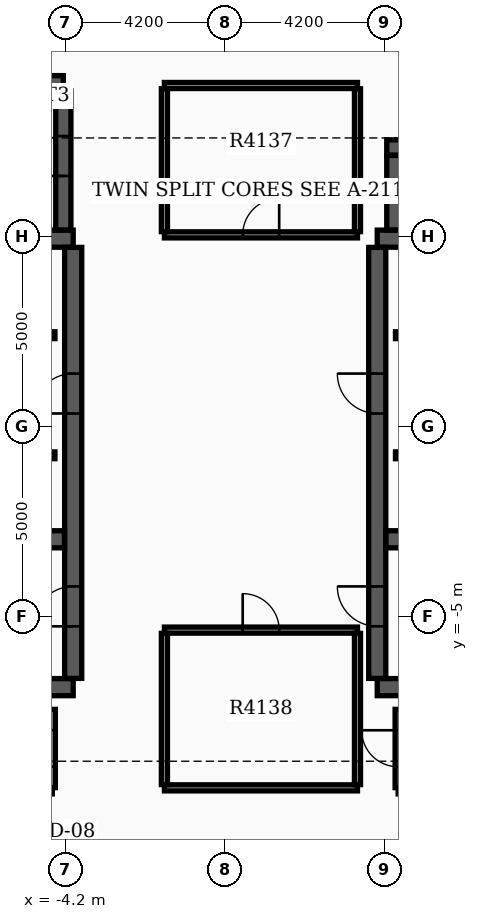
"""IFC4 building model, lengths in metres.
Left out: names, types, materials, properties, quantities, classifications, styles, units other than length and angle.
Written with IfcOpenShell. Run it as: python <this file> out.ifc"""

import sys

from ifc_helpers import new_model, si_unit, direction, frame, frame_2d, origin, place, context, subcontext, project, spatial, rectangle, extrude, element, fill, save


model = new_model("IFC4")
c1 = context("Model", 3, precision=1e-05, world=origin(), true_north=direction((0.0, 1.0)))
c2 = subcontext(c1, "Body", "Model", "MODEL_VIEW")
j1 = project(units=[si_unit("LENGTHUNIT", "METRE"), si_unit("PLANEANGLEUNIT", "RADIAN")], contexts=[c1])
p1 = place(None, origin())
s1 = spatial("IfcSite", under=j1, at=p1, CompositionType="ELEMENT")
p2 = place(p1, origin())
s2 = spatial("IfcBuilding", under=s1, at=p2, CompositionType="ELEMENT")
p3 = place(p2, frame((0.0, 0.0, 261.6)))
s3 = spatial("IfcBuildingStorey", under=s2, at=p3, CompositionType="ELEMENT", Elevation=261.6)
for number, where, z_axis, x_axis in (
    (1, (-12.4, -6.85, 0.0), (0.0, 0.0, 1.0), (1.0, 0.0, 0.0)),
    (2, (-12.4, 4.95, 0.0), (0.0, 0.0, 1.0), (1.0, 0.0, 0.0)),
):
    element("IfcWall", number, at=place(p3, frame(where, z_axis=z_axis, x_axis=x_axis)), inside=s3, PredefinedType="SHEAR", context=c2, shape_type="SweptSolid", body=[
        extrude(rectangle(XDim=8.4, YDim=0.45, at=frame_2d((4.2, 0.0))), origin(), (0.0, 0.0, 1.0), 3.7),
    ])
p4 = place(p3, frame((-4.0, -6.62, 0.0), z_axis=(0.0, 0.0, 1.0), x_axis=(0.0, 1.0, 0.0)))
e3 = element("IfcWall", 3, at=p4, inside=s3, PredefinedType="SHEAR", context=c2, shape_type="SweptSolid", body=[
    extrude(rectangle(XDim=11.34, YDim=0.45, at=frame_2d((5.67, 0.0))), origin(), (0.0, 0.0, 1.0), 3.7),
])
p5 = place(p4, frame((1.37, 0.0, 0.0)))
e4 = element("IfcOpeningElement", 4, at=p5, cuts=e3, PredefinedType="OPENING", context=c2, shape_type="SweptSolid", body=[
    extrude(rectangle(XDim=1.05, YDim=2.15, at=frame_2d((0.525, 1.075))), frame((0.0, 0.235, 0.0), z_axis=(0.0, -1.0, 0.0), x_axis=(1.0, 0.0, 0.0)), (0.0, 0.0, 1.0), 0.47),
])
p6 = place(p4, frame((6.97, 0.0, 0.0)))
e5 = element("IfcOpeningElement", 5, at=p6, cuts=e3, PredefinedType="OPENING", context=c2, shape_type="SweptSolid", body=[
    extrude(rectangle(XDim=1.05, YDim=2.15, at=frame_2d((0.525, 1.075))), frame((0.0, 0.235, 0.0), z_axis=(0.0, -1.0, 0.0), x_axis=(1.0, 0.0, 0.0)), (0.0, 0.0, 1.0), 0.47),
])
p7 = place(p3, frame((-12.17, -2.96, 0.0), z_axis=(0.0, 0.0, 1.0), x_axis=(1.0, 0.0, 0.0)))
e6 = element("IfcWall", 6, at=p7, inside=s3, PredefinedType="SHEAR", context=c2, shape_type="SweptSolid", body=[
    extrude(rectangle(XDim=7.94, YDim=0.45, at=frame_2d((3.97, 0.0))), origin(), (0.0, 0.0, 1.0), 3.7),
])
for number, where, z_axis, x_axis in (
    (7, (4.0, -6.85, 0.0), (0.0, 0.0, 1.0), (1.0, 0.0, 0.0)),
    (8, (4.0, 4.95, 0.0), (0.0, 0.0, 1.0), (1.0, 0.0, 0.0)),
):
    element("IfcWall", number, at=place(p3, frame(where, z_axis=z_axis, x_axis=x_axis)), inside=s3, PredefinedType="SHEAR", context=c2, shape_type="SweptSolid", body=[
        extrude(rectangle(XDim=8.4, YDim=0.45, at=frame_2d((4.2, 0.0))), origin(), (0.0, 0.0, 1.0), 3.7),
    ])
p8 = place(p3, frame((4.0, -6.62, 0.0), z_axis=(0.0, 0.0, 1.0), x_axis=(0.0, 1.0, 0.0)))
e9 = element("IfcWall", 9, at=p8, inside=s3, PredefinedType="SHEAR", context=c2, shape_type="SweptSolid", body=[
    extrude(rectangle(XDim=11.34, YDim=0.45, at=frame_2d((5.67, 0.0))), origin(), (0.0, 0.0, 1.0), 3.7),
])
p9 = place(p8, frame((1.37, 0.0, 0.0)))
e10 = element("IfcOpeningElement", 10, at=p9, cuts=e9, PredefinedType="OPENING", context=c2, shape_type="SweptSolid", body=[
    extrude(rectangle(XDim=1.05, YDim=2.15, at=frame_2d((0.525, 1.075))), frame((0.0, 0.235, 0.0), z_axis=(0.0, -1.0, 0.0), x_axis=(1.0, 0.0, 0.0)), (0.0, 0.0, 1.0), 0.47),
])
p10 = place(p8, frame((6.97, 0.0, 0.0)))
e11 = element("IfcOpeningElement", 11, at=p10, cuts=e9, PredefinedType="OPENING", context=c2, shape_type="SweptSolid", body=[
    extrude(rectangle(XDim=1.05, YDim=2.15, at=frame_2d((0.525, 1.075))), frame((0.0, 0.235, 0.0), z_axis=(0.0, -1.0, 0.0), x_axis=(1.0, 0.0, 0.0)), (0.0, 0.0, 1.0), 0.47),
])
p11 = place(p3, frame((4.23, -2.96, 0.0), z_axis=(0.0, 0.0, 1.0), x_axis=(1.0, 0.0, 0.0)))
e12 = element("IfcWall", 12, at=p11, inside=s3, PredefinedType="SHEAR", context=c2, shape_type="SweptSolid", body=[
    extrude(rectangle(XDim=7.94, YDim=0.45, at=frame_2d((3.97, 0.0))), origin(), (0.0, 0.0, 1.0), 3.7),
])
p12 = place(p3, frame((-12.22, 9.04, 0.0), z_axis=(0.0, 0.0, 1.0), x_axis=(1.0, 0.0, 0.0)))
e13 = element("IfcWall", 13, at=p12, inside=s3, PredefinedType="SHEAR", context=c2, shape_type="SweptSolid", body=[
    extrude(rectangle(XDim=7.96, YDim=0.4, at=frame_2d((3.98, 0.0))), origin(), (0.0, 0.0, 1.0), 3.7),
])
p13 = place(p3, frame((-4.26, 5.18, 0.0), z_axis=(0.0, 0.0, 1.0), x_axis=(0.0, 1.0, 0.0)))
e14 = element("IfcWall", 14, at=p13, inside=s3, PredefinedType="SHEAR", context=c2, shape_type="SweptSolid", body=[
    extrude(rectangle(XDim=3.655, YDim=0.4, at=frame_2d((1.828, 0.0))), origin(), (0.0, 0.0, 1.0), 3.7),
])
p14 = place(p13, frame((1.42, 0.0, 0.0)))
e15 = element("IfcOpeningElement", 15, at=p14, cuts=e14, PredefinedType="OPENING", context=c2, shape_type="SweptSolid", body=[
    extrude(rectangle(XDim=1.05, YDim=2.15, at=frame_2d((0.525, 1.075))), frame((0.0, 0.21, 0.0), z_axis=(0.0, -1.0, 0.0), x_axis=(1.0, 0.0, 0.0)), (0.0, 0.0, 1.0), 0.42),
])
p15 = place(p3, frame((4.45, 5.18, 0.0), z_axis=(0.0, 0.0, 1.0), x_axis=(0.0, 1.0, 0.0)))
e16 = element("IfcWall", 16, at=p15, inside=s3, PredefinedType="SHEAR", context=c2, shape_type="SweptSolid", body=[
    extrude(rectangle(XDim=1.96, YDim=0.4, at=frame_2d((0.98, 0.0))), origin(), (0.0, 0.0, 1.0), 3.7),
])
p16 = place(p3, frame((4.25, 7.35, 0.0), z_axis=(0.0, 0.0, 1.0), x_axis=(1.0, 0.0, 0.0)))
e17 = element("IfcWall", 17, at=p16, inside=s3, PredefinedType="SHEAR", context=c2, shape_type="SweptSolid", body=[
    extrude(rectangle(XDim=5.4, YDim=0.4, at=frame_2d((2.7, 0.0))), origin(), (0.0, 0.0, 1.0), 3.7),
])
p17 = place(p3, frame((-11.9, 2.41, 0.0), z_axis=(0.0, 0.0, 1.0), x_axis=(1.0, 0.0, 0.0)))
e18 = element("IfcWall", 18, at=p17, inside=s3, PredefinedType="SOLIDWALL", context=c2, shape_type="SweptSolid", body=[
    extrude(rectangle(XDim=7.42, YDim=0.18, at=frame_2d((3.71, 0.0))), origin(), (0.0, 0.0, 1.0), 3.17),
])
p18 = place(p17, frame((0.55, 0.0, 0.0)))
e19 = element("IfcOpeningElement", 19, at=p18, cuts=e18, PredefinedType="OPENING", context=c2, shape_type="SweptSolid", body=[
    extrude(rectangle(XDim=1.1, YDim=2.15, at=frame_2d((0.55, 1.075))), frame((0.0, 0.1, 0.0), z_axis=(0.0, -1.0, 0.0), x_axis=(1.0, 0.0, 0.0)), (0.0, 0.0, 1.0), 0.2),
])
p19 = place(p17, frame((4.9, 0.0, 0.0)))
e20 = element("IfcOpeningElement", 20, at=p19, cuts=e18, PredefinedType="OPENING", context=c2, shape_type="SweptSolid", body=[
    extrude(rectangle(XDim=0.88, YDim=2.1, at=frame_2d((0.44, 1.05))), frame((0.0, 0.1, 0.0), z_axis=(0.0, -1.0, 0.0), x_axis=(1.0, 0.0, 0.0)), (0.0, 0.0, 1.0), 0.2),
])
p20 = place(p3, frame((4.48, 2.41, 0.0), z_axis=(0.0, 0.0, 1.0), x_axis=(1.0, 0.0, 0.0)))
e21 = element("IfcWall", 21, at=p20, inside=s3, PredefinedType="SOLIDWALL", context=c2, shape_type="SweptSolid", body=[
    extrude(rectangle(XDim=7.42, YDim=0.18, at=frame_2d((3.71, 0.0))), origin(), (0.0, 0.0, 1.0), 3.17),
])
p21 = place(p20, frame((5.67, 0.0, 0.0)))
e22 = element("IfcOpeningElement", 22, at=p21, cuts=e21, PredefinedType="OPENING", context=c2, shape_type="SweptSolid", body=[
    extrude(rectangle(XDim=1.1, YDim=2.15, at=frame_2d((0.55, 1.075))), frame((0.0, 0.1, 0.0), z_axis=(0.0, -1.0, 0.0), x_axis=(1.0, 0.0, 0.0)), (0.0, 0.0, 1.0), 0.2),
])
p22 = place(p20, frame((1.6, 0.0, 0.0)))
e23 = element("IfcOpeningElement", 23, at=p22, cuts=e21, PredefinedType="OPENING", context=c2, shape_type="SweptSolid", body=[
    extrude(rectangle(XDim=0.88, YDim=2.1, at=frame_2d((0.44, 1.05))), frame((0.0, 0.1, 0.0), z_axis=(0.0, -1.0, 0.0), x_axis=(1.0, 0.0, 0.0)), (0.0, 0.0, 1.0), 0.2),
])
p23 = place(p3, frame((-11.9, -0.75, 0.0), z_axis=(0.0, 0.0, 1.0), x_axis=(1.0, 0.0, 0.0)))
e24 = element("IfcWall", 24, at=p23, inside=s3, PredefinedType="SOLIDWALL", context=c2, shape_type="SweptSolid", body=[
    extrude(rectangle(XDim=7.42, YDim=0.18, at=frame_2d((3.71, 0.0))), origin(), (0.0, 0.0, 1.0), 3.17),
])
p24 = place(p23, frame((5.75, 0.0, 0.0)))
e25 = element("IfcOpeningElement", 25, at=p24, cuts=e24, PredefinedType="OPENING", context=c2, shape_type="SweptSolid", body=[
    extrude(rectangle(XDim=1.1, YDim=2.15, at=frame_2d((0.55, 1.075))), frame((0.0, 0.1, 0.0), z_axis=(0.0, -1.0, 0.0), x_axis=(1.0, 0.0, 0.0)), (0.0, 0.0, 1.0), 0.2),
])
p25 = place(p23, frame((1.6, 0.0, 0.0)))
e26 = element("IfcOpeningElement", 26, at=p25, cuts=e24, PredefinedType="OPENING", context=c2, shape_type="SweptSolid", body=[
    extrude(rectangle(XDim=0.88, YDim=2.1, at=frame_2d((0.44, 1.05))), frame((0.0, 0.1, 0.0), z_axis=(0.0, -1.0, 0.0), x_axis=(1.0, 0.0, 0.0)), (0.0, 0.0, 1.0), 0.2),
])
p26 = place(p3, frame((4.48, -0.75, 0.0), z_axis=(0.0, 0.0, 1.0), x_axis=(1.0, 0.0, 0.0)))
e27 = element("IfcWall", 27, at=p26, inside=s3, PredefinedType="SOLIDWALL", context=c2, shape_type="SweptSolid", body=[
    extrude(rectangle(XDim=7.42, YDim=0.18, at=frame_2d((3.71, 0.0))), origin(), (0.0, 0.0, 1.0), 3.17),
])
p27 = place(p26, frame((3.92, 0.0, 0.0)))
e28 = element("IfcOpeningElement", 28, at=p27, cuts=e27, PredefinedType="OPENING", context=c2, shape_type="SweptSolid", body=[
    extrude(rectangle(XDim=1.1, YDim=2.15, at=frame_2d((0.55, 1.075))), frame((0.0, 0.1, 0.0), z_axis=(0.0, -1.0, 0.0), x_axis=(1.0, 0.0, 0.0)), (0.0, 0.0, 1.0), 0.2),
])
p28 = place(p26, frame((5.82, 0.0, 0.0)))
e29 = element("IfcOpeningElement", 29, at=p28, cuts=e27, PredefinedType="OPENING", context=c2, shape_type="SweptSolid", body=[
    extrude(rectangle(XDim=1.1, YDim=2.15, at=frame_2d((0.55, 1.075))), frame((0.0, 0.1, 0.0), z_axis=(0.0, -1.0, 0.0), x_axis=(1.0, 0.0, 0.0)), (0.0, 0.0, 1.0), 0.2),
])
p29 = place(p26, frame((1.6, 0.0, 0.0)))
e30 = element("IfcOpeningElement", 30, at=p29, cuts=e27, PredefinedType="OPENING", context=c2, shape_type="SweptSolid", body=[
    extrude(rectangle(XDim=0.88, YDim=2.1, at=frame_2d((0.44, 1.05))), frame((0.0, 0.1, 0.0), z_axis=(0.0, -1.0, 0.0), x_axis=(1.0, 0.0, 0.0)), (0.0, 0.0, 1.0), 0.2),
])
p30 = place(p3, frame((-1.6, 5.05, 0.0), z_axis=(0.0, 0.0, 1.0), x_axis=(1.0, 0.0, 0.0)))
e31 = element("IfcWall", 31, at=p30, inside=s3, PredefinedType="PARTITIONING", context=c2, shape_type="SweptSolid", body=[
    extrude(rectangle(XDim=5.08, YDim=0.16, at=frame_2d((2.54, 0.0))), origin(), (0.0, 0.0, 1.0), 3.17),
])
p31 = place(p30, frame((2.06, 0.0, 0.0)))
e32 = element("IfcOpeningElement", 32, at=p31, cuts=e31, PredefinedType="OPENING", context=c2, shape_type="SweptSolid", body=[
    extrude(rectangle(XDim=0.96, YDim=2.15, at=frame_2d((0.48, 1.075))), frame((0.0, 0.09, 0.0), z_axis=(0.0, -1.0, 0.0), x_axis=(1.0, 0.0, 0.0)), (0.0, 0.0, 1.0), 0.18),
])
p32 = place(p3, frame((-1.6, 8.98, 0.0), z_axis=(0.0, 0.0, 1.0), x_axis=(1.0, 0.0, 0.0)))
e33 = element("IfcWall", 33, at=p32, inside=s3, PredefinedType="PARTITIONING", context=c2, shape_type="SweptSolid", body=[
    extrude(rectangle(XDim=5.08, YDim=0.16, at=frame_2d((2.54, 0.0))), origin(), (0.0, 0.0, 1.0), 3.17),
])
for number, where, z_axis, x_axis in (
    (34, (-1.6, 5.135, 0.0), (0.0, 0.0, 1.0), (0.0, 1.0, 0.0)),
    (35, (3.48, 5.135, 0.0), (0.0, 0.0, 1.0), (0.0, 1.0, 0.0)),
):
    element("IfcWall", number, at=place(p3, frame(where, z_axis=z_axis, x_axis=x_axis)), inside=s3, PredefinedType="PARTITIONING", context=c2, shape_type="SweptSolid", body=[
        extrude(rectangle(XDim=3.76, YDim=0.16, at=frame_2d((1.88, 0.0))), origin(), (0.0, 0.0, 1.0), 3.17),
    ])
p33 = place(p3, frame((-1.6, -9.5, 0.0), z_axis=(0.0, 0.0, 1.0), x_axis=(1.0, 0.0, 0.0)))
e36 = element("IfcWall", 36, at=p33, inside=s3, PredefinedType="PARTITIONING", context=c2, shape_type="SweptSolid", body=[
    extrude(rectangle(XDim=5.08, YDim=0.16, at=frame_2d((2.54, 0.0))), origin(), (0.0, 0.0, 1.0), 3.17),
])
p34 = place(p3, frame((-1.6, -5.35, 0.0), z_axis=(0.0, 0.0, 1.0), x_axis=(1.0, 0.0, 0.0)))
e37 = element("IfcWall", 37, at=p34, inside=s3, PredefinedType="PARTITIONING", context=c2, shape_type="SweptSolid", body=[
    extrude(rectangle(XDim=5.08, YDim=0.16, at=frame_2d((2.54, 0.0))), origin(), (0.0, 0.0, 1.0), 3.17),
])
p35 = place(p34, frame((2.06, 0.0, 0.0)))
e38 = element("IfcOpeningElement", 38, at=p35, cuts=e37, PredefinedType="OPENING", context=c2, shape_type="SweptSolid", body=[
    extrude(rectangle(XDim=0.96, YDim=2.15, at=frame_2d((0.48, 1.075))), frame((0.0, 0.09, 0.0), z_axis=(0.0, -1.0, 0.0), x_axis=(1.0, 0.0, 0.0)), (0.0, 0.0, 1.0), 0.18),
])
for number, where, z_axis, x_axis in (
    (39, (-1.6, -9.415, 0.0), (0.0, 0.0, 1.0), (0.0, 1.0, 0.0)),
    (40, (3.48, -9.415, 0.0), (0.0, 0.0, 1.0), (0.0, 1.0, 0.0)),
):
    element("IfcWall", number, at=place(p3, frame(where, z_axis=z_axis, x_axis=x_axis)), inside=s3, PredefinedType="PARTITIONING", context=c2, shape_type="SweptSolid", body=[
        extrude(rectangle(XDim=3.98, YDim=0.16, at=frame_2d((1.99, 0.0))), origin(), (0.0, 0.0, 1.0), 3.17),
    ])
p36 = place(p3, frame((4.55, -9.58, 0.0), z_axis=(0.0, 0.0, 1.0), x_axis=(1.0, 0.0, 0.0)))
e41 = element("IfcWall", 41, at=p36, inside=s3, PredefinedType="PARTITIONING", context=c2, shape_type="SweptSolid", body=[
    extrude(rectangle(XDim=8.1, YDim=0.16, at=frame_2d((4.05, 0.0))), origin(), (0.0, 0.0, 1.0), 3.17),
])
p37 = place(p3, frame((4.55, -9.495, 0.0), z_axis=(0.0, 0.0, 1.0), x_axis=(0.0, 1.0, 0.0)))
e42 = element("IfcWall", 42, at=p37, inside=s3, PredefinedType="PARTITIONING", context=c2, shape_type="SweptSolid", body=[
    extrude(rectangle(XDim=2.06, YDim=0.16, at=frame_2d((1.03, 0.0))), origin(), (0.0, 0.0, 1.0), 3.17),
])
p38 = place(p37, frame((0.55, 0.0, 0.0)))
e43 = element("IfcOpeningElement", 43, at=p38, cuts=e42, PredefinedType="OPENING", context=c2, shape_type="SweptSolid", body=[
    extrude(rectangle(XDim=0.96, YDim=2.15, at=frame_2d((0.48, 1.075))), frame((0.0, 0.09, 0.0), z_axis=(0.0, -1.0, 0.0), x_axis=(1.0, 0.0, 0.0)), (0.0, 0.0, 1.0), 0.18),
])
p39 = place(p3, frame((-4.55, -9.495, 0.0), z_axis=(0.0, 0.0, 1.0), x_axis=(0.0, 1.0, 0.0)))
e44 = element("IfcWall", 44, at=p39, inside=s3, PredefinedType="PARTITIONING", context=c2, shape_type="SweptSolid", body=[
    extrude(rectangle(XDim=2.06, YDim=0.16, at=frame_2d((1.03, 0.0))), origin(), (0.0, 0.0, 1.0), 3.17),
])
p40 = place(p39, frame((0.55, 0.0, 0.0)))
e45 = element("IfcOpeningElement", 45, at=p40, cuts=e44, PredefinedType="OPENING", context=c2, shape_type="SweptSolid", body=[
    extrude(rectangle(XDim=0.96, YDim=2.15, at=frame_2d((0.48, 1.075))), frame((0.0, 0.09, 0.0), z_axis=(0.0, -1.0, 0.0), x_axis=(1.0, 0.0, 0.0)), (0.0, 0.0, 1.0), 0.18),
])
p41 = place(p5, origin())
e46 = element("IfcDoor", 46, at=p41, inside=s3, OperationType="SINGLE_SWING_LEFT", PredefinedType="DOOR", context=c2, shape_type="SweptSolid", body=[
    extrude(rectangle(XDim=1.05, YDim=2.15, at=frame_2d((0.525, 1.075))), frame((0.0, 0.025, 0.0), z_axis=(0.0, -1.0, 0.0), x_axis=(1.0, 0.0, 0.0)), (0.0, 0.0, 1.0), 0.05),
])
fill(e4, e46)
p42 = place(p9, origin())
e47 = element("IfcDoor", 47, at=p42, inside=s3, OperationType="SINGLE_SWING_RIGHT", PredefinedType="DOOR", context=c2, shape_type="SweptSolid", body=[
    extrude(rectangle(XDim=1.05, YDim=2.15, at=frame_2d((0.525, 1.075))), frame((0.0, 0.025, 0.0), z_axis=(0.0, -1.0, 0.0), x_axis=(1.0, 0.0, 0.0)), (0.0, 0.0, 1.0), 0.05),
])
fill(e10, e47)
p43 = place(p6, origin())
e48 = element("IfcDoor", 48, at=p43, inside=s3, OperationType="SINGLE_SWING_LEFT", PredefinedType="DOOR", context=c2, shape_type="SweptSolid", body=[
    extrude(rectangle(XDim=1.05, YDim=2.15, at=frame_2d((0.525, 1.075))), frame((0.0, 0.025, 0.0), z_axis=(0.0, -1.0, 0.0), x_axis=(1.0, 0.0, 0.0)), (0.0, 0.0, 1.0), 0.05),
])
fill(e5, e48)
p44 = place(p10, origin())
e49 = element("IfcDoor", 49, at=p44, inside=s3, OperationType="SINGLE_SWING_RIGHT", PredefinedType="DOOR", context=c2, shape_type="SweptSolid", body=[
    extrude(rectangle(XDim=1.05, YDim=2.15, at=frame_2d((0.525, 1.075))), frame((0.0, 0.025, 0.0), z_axis=(0.0, -1.0, 0.0), x_axis=(1.0, 0.0, 0.0)), (0.0, 0.0, 1.0), 0.05),
])
fill(e11, e49)
p45 = place(p14, origin())
e50 = element("IfcDoor", 50, at=p45, inside=s3, OperationType="SINGLE_SWING_LEFT", PredefinedType="DOOR", context=c2, shape_type="SweptSolid", body=[
    extrude(rectangle(XDim=1.05, YDim=2.15, at=frame_2d((0.525, 1.075))), frame((0.0, 0.025, 0.0), z_axis=(0.0, -1.0, 0.0), x_axis=(1.0, 0.0, 0.0)), (0.0, 0.0, 1.0), 0.05),
])
fill(e15, e50)
p46 = place(p31, origin())
e51 = element("IfcDoor", 51, at=p46, inside=s3, OperationType="SINGLE_SWING_RIGHT", PredefinedType="DOOR", context=c2, shape_type="SweptSolid", body=[
    extrude(rectangle(XDim=0.96, YDim=2.15, at=frame_2d((0.48, 1.075))), frame((0.0, 0.025, 0.0), z_axis=(0.0, -1.0, 0.0), x_axis=(1.0, 0.0, 0.0)), (0.0, 0.0, 1.0), 0.05),
])
fill(e32, e51)
p47 = place(p35, origin())
e52 = element("IfcDoor", 52, at=p47, inside=s3, OperationType="SINGLE_SWING_LEFT", PredefinedType="DOOR", context=c2, shape_type="SweptSolid", body=[
    extrude(rectangle(XDim=0.96, YDim=2.15, at=frame_2d((0.48, 1.075))), frame((0.0, 0.025, 0.0), z_axis=(0.0, -1.0, 0.0), x_axis=(1.0, 0.0, 0.0)), (0.0, 0.0, 1.0), 0.05),
])
fill(e38, e52)
p48 = place(p38, origin())
e53 = element("IfcDoor", 53, at=p48, inside=s3, OperationType="SINGLE_SWING_RIGHT", PredefinedType="DOOR", context=c2, shape_type="SweptSolid", body=[
    extrude(rectangle(XDim=0.96, YDim=2.15, at=frame_2d((0.48, 1.075))), frame((0.0, 0.025, 0.0), z_axis=(0.0, -1.0, 0.0), x_axis=(1.0, 0.0, 0.0)), (0.0, 0.0, 1.0), 0.05),
])
fill(e43, e53)
p49 = place(p40, origin())
e54 = element("IfcDoor", 54, at=p49, inside=s3, OperationType="SINGLE_SWING_LEFT", PredefinedType="DOOR", context=c2, shape_type="SweptSolid", body=[
    extrude(rectangle(XDim=0.96, YDim=2.15, at=frame_2d((0.48, 1.075))), frame((0.0, 0.025, 0.0), z_axis=(0.0, -1.0, 0.0), x_axis=(1.0, 0.0, 0.0)), (0.0, 0.0, 1.0), 0.05),
])
fill(e45, e54)
save(model, sys.argv[1])
